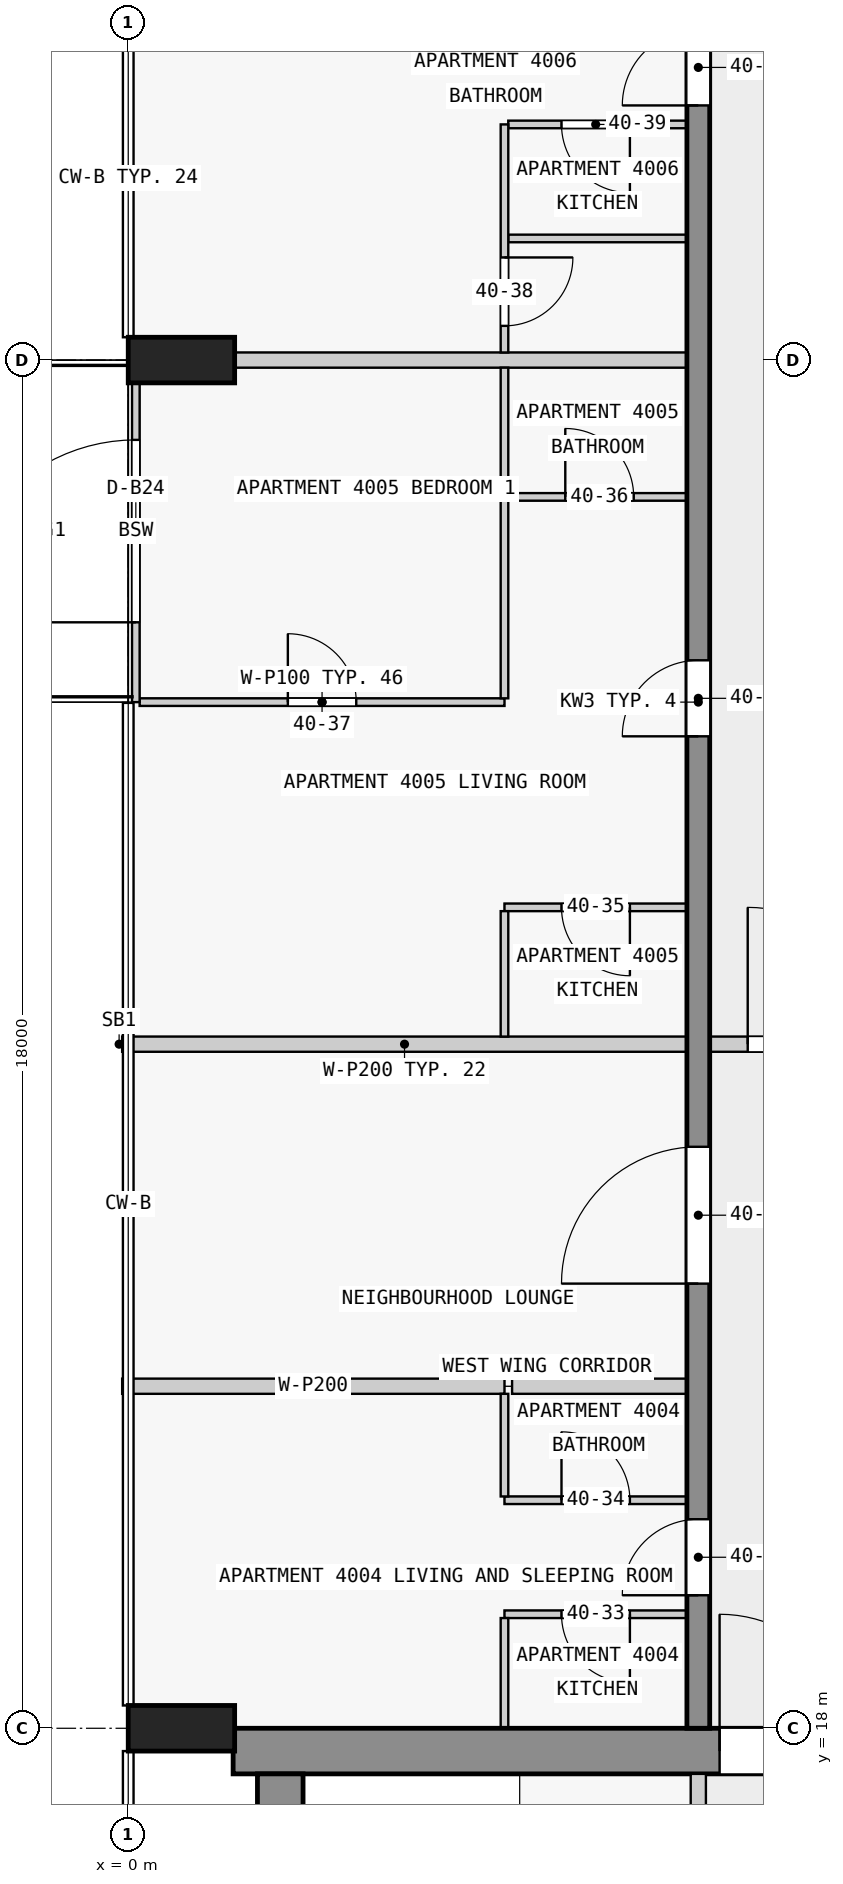
"""IFC4 building model, lengths in metres.
Left out: names, types, materials, properties, quantities, classifications, styles, units other than length and angle.
Written with IfcOpenShell. Run it as: python <this file> out.ifc"""

import sys

from ifc_helpers import new_model, si_unit, direction, frame, frame_2d, origin, origin_2d, place, context, subcontext, project, spatial, rectangle, extrude, element, fill, save


model = new_model("IFC4")
c1 = context("Model", 3, precision=1e-05, world=origin(), true_north=direction((0.0, 1.0)))
c2 = subcontext(c1, "Body", "Model", "MODEL_VIEW")
j1 = project(units=[si_unit("LENGTHUNIT", "METRE"), si_unit("PLANEANGLEUNIT", "RADIAN")], contexts=[c1])
p1 = place(None, origin())
s1 = spatial("IfcSite", under=j1, at=p1, CompositionType="ELEMENT")
p2 = place(p1, origin())
s2 = spatial("IfcBuilding", under=s1, at=p2, CompositionType="ELEMENT")
p3 = place(p2, frame((0.0, 0.0, 156.9)))
s3 = spatial("IfcBuildingStorey", under=s2, at=p3, CompositionType="ELEMENT", Elevation=156.9)
for number, where, z_axis, x_axis in (
    (1, (0.7, 36.0, 0.0), (0.0, 0.0, 1.0), (0.0, 1.0, 0.0)),
    (2, (0.7, 18.0, 0.0), (0.0, 0.0, 1.0), (0.0, 1.0, 0.0)),
):
    element("IfcColumn", number, at=place(p3, frame(where, z_axis=z_axis, x_axis=x_axis)), inside=s3, PredefinedType="COLUMN", context=c2, shape_type="SweptSolid", body=[
        extrude(rectangle(XDim=0.6, YDim=1.4, at=origin_2d()), origin(), (0.0, 0.0, 1.0), 3.5),
    ])
p4 = place(p3, frame((1.38, 17.7, 0.0), z_axis=(0.0, 0.0, 1.0), x_axis=(1.0, 0.0, 0.0)))
e3 = element("IfcWall", 3, at=p4, inside=s3, PredefinedType="SHEAR", context=c2, shape_type="SweptSolid", body=[
    extrude(rectangle(XDim=21.12, YDim=0.6, at=frame_2d((10.56, 0.0))), origin(), (0.0, 0.0, 1.0), 3.25),
])
p5 = place(p4, frame((6.4, 0.0, 0.0)))
e4 = element("IfcOpeningElement", 4, at=p5, cuts=e3, PredefinedType="OPENING", context=c2, shape_type="SweptSolid", body=[
    extrude(rectangle(XDim=1.8, YDim=2.1, at=frame_2d((0.9, 1.05))), frame((0.0, 0.31, 0.0), z_axis=(0.0, -1.0, 0.0), x_axis=(1.0, 0.0, 0.0)), (0.0, 0.0, 1.0), 0.62),
])
p6 = place(p3, frame((2.0, 2.5, 0.0), z_axis=(0.0, 0.0, 1.0), x_axis=(0.0, 1.0, 0.0)))
e5 = element("IfcWall", 5, at=p6, inside=s3, PredefinedType="SHEAR", context=c2, shape_type="SweptSolid", body=[
    extrude(rectangle(XDim=14.9, YDim=0.6, at=frame_2d((7.45, 0.0))), origin(), (0.0, 0.0, 1.0), 3.25),
])
p7 = place(p3, frame((7.5, 18.0, 0.0), z_axis=(0.0, 0.0, 1.0), x_axis=(0.0, 1.0, 0.0)))
e6 = element("IfcWall", 6, at=p7, inside=s3, PredefinedType="SHEAR", context=c2, shape_type="SweptSolid", body=[
    extrude(rectangle(XDim=27.0, YDim=0.3, at=frame_2d((13.5, 0.0))), origin(), (0.0, 0.0, 1.0), 3.25),
])
p8 = place(p7, frame((1.75, 0.0, 0.0)))
e7 = element("IfcOpeningElement", 7, at=p8, cuts=e6, PredefinedType="OPENING", context=c2, shape_type="SweptSolid", body=[
    extrude(rectangle(XDim=1.0, YDim=2.1, at=frame_2d((0.5, 1.05))), frame((0.0, 0.16, 0.0), z_axis=(0.0, -1.0, 0.0), x_axis=(1.0, 0.0, 0.0)), (0.0, 0.0, 1.0), 0.32),
])
p9 = place(p7, frame((5.85, 0.0, 0.0)))
e8 = element("IfcOpeningElement", 8, at=p9, cuts=e6, PredefinedType="OPENING", context=c2, shape_type="SweptSolid", body=[
    extrude(rectangle(XDim=1.8, YDim=2.1, at=frame_2d((0.9, 1.05))), frame((0.0, 0.16, 0.0), z_axis=(0.0, -1.0, 0.0), x_axis=(1.0, 0.0, 0.0)), (0.0, 0.0, 1.0), 0.32),
])
p10 = place(p7, frame((13.05, 0.0, 0.0)))
e9 = element("IfcOpeningElement", 9, at=p10, cuts=e6, PredefinedType="OPENING", context=c2, shape_type="SweptSolid", body=[
    extrude(rectangle(XDim=1.0, YDim=2.1, at=frame_2d((0.5, 1.05))), frame((0.0, 0.16, 0.0), z_axis=(0.0, -1.0, 0.0), x_axis=(1.0, 0.0, 0.0)), (0.0, 0.0, 1.0), 0.32),
])
p11 = place(p7, frame((21.35, 0.0, 0.0)))
e10 = element("IfcOpeningElement", 10, at=p11, cuts=e6, PredefinedType="OPENING", context=c2, shape_type="SweptSolid", body=[
    extrude(rectangle(XDim=1.0, YDim=2.1, at=frame_2d((0.5, 1.05))), frame((0.0, 0.16, 0.0), z_axis=(0.0, -1.0, 0.0), x_axis=(1.0, 0.0, 0.0)), (0.0, 0.0, 1.0), 0.32),
])
p12 = place(p3, frame((0.1, 31.5, 0.0), z_axis=(0.0, 0.0, 1.0), x_axis=(0.0, 1.0, 0.0)))
e11 = element("IfcWall", 11, at=p12, inside=s3, PredefinedType="STANDARD", context=c2, shape_type="SweptSolid", body=[
    extrude(rectangle(XDim=4.5, YDim=0.1, at=frame_2d((2.25, 0.0))), origin(), (0.0, 0.0, 1.0), 3.25),
])
p13 = place(p12, frame((1.05, 0.0, 0.0)))
e12 = element("IfcOpeningElement", 12, at=p13, cuts=e11, PredefinedType="OPENING", context=c2, shape_type="SweptSolid", body=[
    extrude(rectangle(XDim=2.4, YDim=2.4, at=frame_2d((1.2, 1.2))), frame((0.0, 0.06, 0.0), z_axis=(0.0, -1.0, 0.0), x_axis=(1.0, 0.0, 0.0)), (0.0, 0.0, 1.0), 0.12),
])
p14 = place(p3, frame((7.5, 10.1, 0.0), z_axis=(0.0, 0.0, 1.0), x_axis=(0.0, 1.0, 0.0)))
e13 = element("IfcWall", 13, at=p14, inside=s3, PredefinedType="PARTITIONING", context=c2, shape_type="SweptSolid", body=[
    extrude(rectangle(XDim=7.3, YDim=0.2, at=frame_2d((3.65, 0.0))), origin(), (0.0, 0.0, 1.0), 3.25),
])
p15 = place(p14, frame((0.75, 0.0, 0.0)))
e14 = element("IfcOpeningElement", 14, at=p15, cuts=e13, PredefinedType="OPENING", context=c2, shape_type="SweptSolid", body=[
    extrude(rectangle(XDim=0.9, YDim=2.1, at=frame_2d((0.45, 1.05))), frame((0.0, 0.11, 0.0), z_axis=(0.0, -1.0, 0.0), x_axis=(1.0, 0.0, 0.0)), (0.0, 0.0, 1.0), 0.22),
])
p16 = place(p14, frame((3.175, 0.0, 0.0)))
e15 = element("IfcOpeningElement", 15, at=p16, cuts=e13, PredefinedType="OPENING", context=c2, shape_type="SweptSolid", body=[
    extrude(rectangle(XDim=0.9, YDim=2.1, at=frame_2d((0.45, 1.05))), frame((0.0, 0.11, 0.0), z_axis=(0.0, -1.0, 0.0), x_axis=(1.0, 0.0, 0.0)), (0.0, 0.0, 1.0), 0.22),
])
p17 = place(p14, frame((5.25, 0.0, 0.0)))
e16 = element("IfcOpeningElement", 16, at=p17, cuts=e13, PredefinedType="OPENING", context=c2, shape_type="SweptSolid", body=[
    extrude(rectangle(XDim=0.9, YDim=2.1, at=frame_2d((0.45, 1.05))), frame((0.0, 0.11, 0.0), z_axis=(0.0, -1.0, 0.0), x_axis=(1.0, 0.0, 0.0)), (0.0, 0.0, 1.0), 0.22),
])
p18 = place(p3, frame((7.35, 19.5, 0.0), z_axis=(0.0, 0.0, 1.0), x_axis=(-1.0, 0.0, 0.0)))
e17 = element("IfcWall", 17, at=p18, inside=s3, PredefinedType="PARTITIONING", context=c2, shape_type="SweptSolid", body=[
    extrude(rectangle(XDim=2.4, YDim=0.1, at=frame_2d((1.2, 0.0))), origin(), (0.0, 0.0, 1.0), 3.25),
])
p19 = place(p18, frame((0.75, 0.0, 0.0)))
e18 = element("IfcOpeningElement", 18, at=p19, cuts=e17, PredefinedType="OPENING", context=c2, shape_type="SweptSolid", body=[
    extrude(rectangle(XDim=0.9, YDim=2.1, at=frame_2d((0.45, 1.05))), frame((0.0, 0.06, 0.0), z_axis=(0.0, -1.0, 0.0), x_axis=(1.0, 0.0, 0.0)), (0.0, 0.0, 1.0), 0.12),
])
p20 = place(p3, frame((4.95, 21.0, 0.0), z_axis=(0.0, 0.0, 1.0), x_axis=(1.0, 0.0, 0.0)))
e19 = element("IfcWall", 19, at=p20, inside=s3, PredefinedType="PARTITIONING", context=c2, shape_type="SweptSolid", body=[
    extrude(rectangle(XDim=2.4, YDim=0.1, at=frame_2d((1.2, 0.0))), origin(), (0.0, 0.0, 1.0), 3.25),
])
p21 = place(p20, frame((0.75, 0.0, 0.0)))
e20 = element("IfcOpeningElement", 20, at=p21, cuts=e19, PredefinedType="OPENING", context=c2, shape_type="SweptSolid", body=[
    extrude(rectangle(XDim=0.9, YDim=2.1, at=frame_2d((0.45, 1.05))), frame((0.0, 0.06, 0.0), z_axis=(0.0, -1.0, 0.0), x_axis=(1.0, 0.0, 0.0)), (0.0, 0.0, 1.0), 0.12),
])
p22 = place(p3, frame((7.35, 22.5, 0.0), z_axis=(0.0, 0.0, 1.0), x_axis=(-1.0, 0.0, 0.0)))
e21 = element("IfcWall", 21, at=p22, inside=s3, PredefinedType="PARTITIONING", context=c2, shape_type="SweptSolid", body=[
    extrude(rectangle(XDim=2.3, YDim=0.2, at=frame_2d((1.15, 0.0))), origin(), (0.0, 0.0, 1.0), 3.25),
])
p23 = place(p3, frame((-0.08, 22.5, 0.0), z_axis=(0.0, 0.0, 1.0), x_axis=(1.0, 0.0, 0.0)))
e22 = element("IfcWall", 22, at=p23, inside=s3, PredefinedType="PARTITIONING", context=c2, shape_type="SweptSolid", body=[
    extrude(rectangle(XDim=5.03, YDim=0.2, at=frame_2d((2.515, 0.0))), origin(), (0.0, 0.0, 1.0), 3.25),
])
p24 = place(p3, frame((7.35, 27.0, 0.0), z_axis=(0.0, 0.0, 1.0), x_axis=(-1.0, 0.0, 0.0)))
e23 = element("IfcWall", 23, at=p24, inside=s3, PredefinedType="PARTITIONING", context=c2, shape_type="SweptSolid", body=[
    extrude(rectangle(XDim=7.43, YDim=0.2, at=frame_2d((3.715, 0.0))), origin(), (0.0, 0.0, 1.0), 3.25),
])
p25 = place(p3, frame((7.35, 28.8, 0.0), z_axis=(0.0, 0.0, 1.0), x_axis=(-1.0, 0.0, 0.0)))
e24 = element("IfcWall", 24, at=p25, inside=s3, PredefinedType="PARTITIONING", context=c2, shape_type="SweptSolid", body=[
    extrude(rectangle(XDim=2.4, YDim=0.1, at=frame_2d((1.2, 0.0))), origin(), (0.0, 0.0, 1.0), 3.25),
])
p26 = place(p25, frame((0.75, 0.0, 0.0)))
e25 = element("IfcOpeningElement", 25, at=p26, cuts=e24, PredefinedType="OPENING", context=c2, shape_type="SweptSolid", body=[
    extrude(rectangle(XDim=0.9, YDim=2.1, at=frame_2d((0.45, 1.05))), frame((0.0, 0.06, 0.0), z_axis=(0.0, -1.0, 0.0), x_axis=(1.0, 0.0, 0.0)), (0.0, 0.0, 1.0), 0.12),
])
p27 = place(p3, frame((0.15, 31.5, 0.0), z_axis=(0.0, 0.0, 1.0), x_axis=(1.0, 0.0, 0.0)))
e26 = element("IfcWall", 26, at=p27, inside=s3, PredefinedType="PARTITIONING", context=c2, shape_type="SweptSolid", body=[
    extrude(rectangle(XDim=4.8, YDim=0.1, at=frame_2d((2.4, 0.0))), origin(), (0.0, 0.0, 1.0), 3.25),
])
p28 = place(p27, frame((1.95, 0.0, 0.0)))
e27 = element("IfcOpeningElement", 27, at=p28, cuts=e26, PredefinedType="OPENING", context=c2, shape_type="SweptSolid", body=[
    extrude(rectangle(XDim=0.9, YDim=2.1, at=frame_2d((0.45, 1.05))), frame((0.0, 0.06, 0.0), z_axis=(0.0, -1.0, 0.0), x_axis=(1.0, 0.0, 0.0)), (0.0, 0.0, 1.0), 0.12),
])
p29 = place(p3, frame((5.0, 34.2, 0.0), z_axis=(0.0, 0.0, 1.0), x_axis=(1.0, 0.0, 0.0)))
e28 = element("IfcWall", 28, at=p29, inside=s3, PredefinedType="PARTITIONING", context=c2, shape_type="SweptSolid", body=[
    extrude(rectangle(XDim=2.35, YDim=0.1, at=frame_2d((1.175, 0.0))), origin(), (0.0, 0.0, 1.0), 3.25),
])
p30 = place(p29, frame((0.75, 0.0, 0.0)))
e29 = element("IfcOpeningElement", 29, at=p30, cuts=e28, PredefinedType="OPENING", context=c2, shape_type="SweptSolid", body=[
    extrude(rectangle(XDim=0.9, YDim=2.1, at=frame_2d((0.45, 1.05))), frame((0.0, 0.06, 0.0), z_axis=(0.0, -1.0, 0.0), x_axis=(1.0, 0.0, 0.0)), (0.0, 0.0, 1.0), 0.12),
])
p31 = place(p3, frame((7.35, 36.0, 0.0), z_axis=(0.0, 0.0, 1.0), x_axis=(-1.0, 0.0, 0.0)))
e30 = element("IfcWall", 30, at=p31, inside=s3, PredefinedType="PARTITIONING", context=c2, shape_type="SweptSolid", body=[
    extrude(rectangle(XDim=5.95, YDim=0.2, at=frame_2d((2.975, 0.0))), origin(), (0.0, 0.0, 1.0), 3.25),
])
p32 = place(p3, frame((7.35, 37.6, 0.0), z_axis=(0.0, 0.0, 1.0), x_axis=(-1.0, 0.0, 0.0)))
e31 = element("IfcWall", 31, at=p32, inside=s3, PredefinedType="PARTITIONING", context=c2, shape_type="SweptSolid", body=[
    extrude(rectangle(XDim=2.35, YDim=0.1, at=frame_2d((1.175, 0.0))), origin(), (0.0, 0.0, 1.0), 3.25),
])
p33 = place(p3, frame((7.35, 39.1, 0.0), z_axis=(0.0, 0.0, 1.0), x_axis=(-1.0, 0.0, 0.0)))
e32 = element("IfcWall", 32, at=p33, inside=s3, PredefinedType="PARTITIONING", context=c2, shape_type="SweptSolid", body=[
    extrude(rectangle(XDim=2.35, YDim=0.1, at=frame_2d((1.175, 0.0))), origin(), (0.0, 0.0, 1.0), 3.25),
])
p34 = place(p33, frame((0.75, 0.0, 0.0)))
e33 = element("IfcOpeningElement", 33, at=p34, cuts=e32, PredefinedType="OPENING", context=c2, shape_type="SweptSolid", body=[
    extrude(rectangle(XDim=0.9, YDim=2.1, at=frame_2d((0.45, 1.05))), frame((0.0, 0.06, 0.0), z_axis=(0.0, -1.0, 0.0), x_axis=(1.0, 0.0, 0.0)), (0.0, 0.0, 1.0), 0.12),
])
p35 = place(p3, frame((4.95, 19.45, 0.0), z_axis=(0.0, 0.0, 1.0), x_axis=(0.0, -1.0, 0.0)))
e34 = element("IfcWall", 34, at=p35, inside=s3, PredefinedType="PARTITIONING", context=c2, shape_type="SweptSolid", body=[
    extrude(rectangle(XDim=1.45, YDim=0.1, at=frame_2d((0.725, 0.0))), origin(), (0.0, 0.0, 1.0), 3.25),
])
p36 = place(p3, frame((4.95, 22.4, 0.0), z_axis=(0.0, 0.0, 1.0), x_axis=(0.0, -1.0, 0.0)))
e35 = element("IfcWall", 35, at=p36, inside=s3, PredefinedType="PARTITIONING", context=c2, shape_type="SweptSolid", body=[
    extrude(rectangle(XDim=1.35, YDim=0.1, at=frame_2d((0.675, 0.0))), origin(), (0.0, 0.0, 1.0), 3.25),
])
p37 = place(p3, frame((4.95, 28.75, 0.0), z_axis=(0.0, 0.0, 1.0), x_axis=(0.0, -1.0, 0.0)))
e36 = element("IfcWall", 36, at=p37, inside=s3, PredefinedType="PARTITIONING", context=c2, shape_type="SweptSolid", body=[
    extrude(rectangle(XDim=1.65, YDim=0.1, at=frame_2d((0.825, 0.0))), origin(), (0.0, 0.0, 1.0), 3.25),
])
p38 = place(p3, frame((4.95, 35.9, 0.0), z_axis=(0.0, 0.0, 1.0), x_axis=(0.0, -1.0, 0.0)))
e37 = element("IfcWall", 37, at=p38, inside=s3, PredefinedType="PARTITIONING", context=c2, shape_type="SweptSolid", body=[
    extrude(rectangle(XDim=1.7, YDim=0.1, at=frame_2d((0.85, 0.0))), origin(), (0.0, 0.0, 1.0), 3.25),
])
p39 = place(p3, frame((4.95, 39.1, 0.0), z_axis=(0.0, 0.0, 1.0), x_axis=(0.0, -1.0, 0.0)))
e38 = element("IfcWall", 38, at=p39, inside=s3, PredefinedType="PARTITIONING", context=c2, shape_type="SweptSolid", body=[
    extrude(rectangle(XDim=3.0, YDim=0.1, at=frame_2d((1.5, 0.0))), origin(), (0.0, 0.0, 1.0), 3.25),
])
p40 = place(p39, frame((1.75, 0.0, 0.0)))
e39 = element("IfcOpeningElement", 39, at=p40, cuts=e38, PredefinedType="OPENING", context=c2, shape_type="SweptSolid", body=[
    extrude(rectangle(XDim=0.9, YDim=2.1, at=frame_2d((0.45, 1.05))), frame((0.0, 0.06, 0.0), z_axis=(0.0, -1.0, 0.0), x_axis=(1.0, 0.0, 0.0)), (0.0, 0.0, 1.0), 0.12),
])
p41 = place(p3, frame((4.95, 31.55, 0.0), z_axis=(0.0, 0.0, 1.0), x_axis=(0.0, 1.0, 0.0)))
e40 = element("IfcWall", 40, at=p41, inside=s3, PredefinedType="PARTITIONING", context=c2, shape_type="SweptSolid", body=[
    extrude(rectangle(XDim=2.6, YDim=0.1, at=frame_2d((1.3, 0.0))), origin(), (0.0, 0.0, 1.0), 3.25),
])
p42 = place(p3, frame((7.45, 27.0, 0.0), z_axis=(0.0, 0.0, 1.0), x_axis=(1.0, 0.0, 0.0)))
e41 = element("IfcWall", 41, at=p42, inside=s3, PredefinedType="PARTITIONING", context=c2, shape_type="SweptSolid", body=[
    extrude(rectangle(XDim=3.2, YDim=0.2, at=frame_2d((1.6, 0.0))), origin(), (0.0, 0.0, 1.0), 3.25),
])
p43 = place(p42, frame((0.7, 0.0, 0.0)))
e42 = element("IfcOpeningElement", 42, at=p43, cuts=e41, PredefinedType="OPENING", context=c2, shape_type="SweptSolid", body=[
    extrude(rectangle(XDim=1.8, YDim=2.1, at=frame_2d((0.9, 1.05))), frame((0.0, 0.11, 0.0), z_axis=(0.0, -1.0, 0.0), x_axis=(1.0, 0.0, 0.0)), (0.0, 0.0, 1.0), 0.22),
])
p44 = place(p13, origin())
e43 = element("IfcDoor", 43, at=p44, inside=s3, OperationType="SINGLE_SWING_LEFT", PredefinedType="DOOR", context=c2, shape_type="SweptSolid", body=[
    extrude(rectangle(XDim=2.4, YDim=2.4, at=frame_2d((1.2, 1.2))), frame((0.0, 0.025, 0.0), z_axis=(0.0, -1.0, 0.0), x_axis=(1.0, 0.0, 0.0)), (0.0, 0.0, 1.0), 0.05),
])
fill(e12, e43)
p45 = place(p5, origin())
e44 = element("IfcDoor", 44, at=p45, inside=s3, OperationType="DOUBLE_DOOR_SINGLE_SWING", PredefinedType="DOOR", context=c2, shape_type="SweptSolid", body=[
    extrude(rectangle(XDim=1.8, YDim=2.1, at=frame_2d((0.9, 1.05))), frame((0.0, 0.025, 0.0), z_axis=(0.0, -1.0, 0.0), x_axis=(1.0, 0.0, 0.0)), (0.0, 0.0, 1.0), 0.05),
])
fill(e4, e44)
p46 = place(p8, origin())
e45 = element("IfcDoor", 45, at=p46, inside=s3, OperationType="SINGLE_SWING_LEFT", PredefinedType="DOOR", context=c2, shape_type="SweptSolid", body=[
    extrude(rectangle(XDim=1.0, YDim=2.1, at=frame_2d((0.5, 1.05))), frame((0.0, 0.025, 0.0), z_axis=(0.0, -1.0, 0.0), x_axis=(1.0, 0.0, 0.0)), (0.0, 0.0, 1.0), 0.05),
])
fill(e7, e45)
p47 = place(p9, origin())
e46 = element("IfcDoor", 46, at=p47, inside=s3, OperationType="SINGLE_SWING_LEFT", PredefinedType="DOOR", context=c2, shape_type="SweptSolid", body=[
    extrude(rectangle(XDim=1.8, YDim=2.1, at=frame_2d((0.9, 1.05))), frame((0.0, 0.025, 0.0), z_axis=(0.0, -1.0, 0.0), x_axis=(1.0, 0.0, 0.0)), (0.0, 0.0, 1.0), 0.05),
])
fill(e8, e46)
p48 = place(p10, origin())
e47 = element("IfcDoor", 47, at=p48, inside=s3, OperationType="SINGLE_SWING_RIGHT", PredefinedType="DOOR", context=c2, shape_type="SweptSolid", body=[
    extrude(rectangle(XDim=1.0, YDim=2.1, at=frame_2d((0.5, 1.05))), frame((0.0, 0.025, 0.0), z_axis=(0.0, -1.0, 0.0), x_axis=(1.0, 0.0, 0.0)), (0.0, 0.0, 1.0), 0.05),
])
fill(e9, e47)
p49 = place(p11, origin())
e48 = element("IfcDoor", 48, at=p49, inside=s3, OperationType="SINGLE_SWING_RIGHT", PredefinedType="DOOR", context=c2, shape_type="SweptSolid", body=[
    extrude(rectangle(XDim=1.0, YDim=2.1, at=frame_2d((0.5, 1.05))), frame((0.0, 0.025, 0.0), z_axis=(0.0, -1.0, 0.0), x_axis=(1.0, 0.0, 0.0)), (0.0, 0.0, 1.0), 0.05),
])
fill(e10, e48)
p50 = place(p43, origin())
e49 = element("IfcDoor", 49, at=p50, inside=s3, OperationType="SINGLE_SWING_LEFT", PredefinedType="DOOR", context=c2, shape_type="SweptSolid", body=[
    extrude(rectangle(XDim=1.8, YDim=2.1, at=frame_2d((0.9, 1.05))), frame((0.0, 0.025, 0.0), z_axis=(0.0, -1.0, 0.0), x_axis=(1.0, 0.0, 0.0)), (0.0, 0.0, 1.0), 0.05),
])
fill(e42, e49)
p51 = place(p19, origin())
e50 = element("IfcDoor", 50, at=p51, inside=s3, OperationType="SINGLE_SWING_RIGHT", PredefinedType="DOOR", context=c2, shape_type="SweptSolid", body=[
    extrude(rectangle(XDim=0.9, YDim=2.1, at=frame_2d((0.45, 1.05))), frame((0.0, 0.025, 0.0), z_axis=(0.0, -1.0, 0.0), x_axis=(1.0, 0.0, 0.0)), (0.0, 0.0, 1.0), 0.05),
])
fill(e18, e50)
p52 = place(p21, origin())
e51 = element("IfcDoor", 51, at=p52, inside=s3, OperationType="SINGLE_SWING_RIGHT", PredefinedType="DOOR", context=c2, shape_type="SweptSolid", body=[
    extrude(rectangle(XDim=0.9, YDim=2.1, at=frame_2d((0.45, 1.05))), frame((0.0, 0.025, 0.0), z_axis=(0.0, -1.0, 0.0), x_axis=(1.0, 0.0, 0.0)), (0.0, 0.0, 1.0), 0.05),
])
fill(e20, e51)
p53 = place(p26, origin())
e52 = element("IfcDoor", 52, at=p53, inside=s3, OperationType="SINGLE_SWING_RIGHT", PredefinedType="DOOR", context=c2, shape_type="SweptSolid", body=[
    extrude(rectangle(XDim=0.9, YDim=2.1, at=frame_2d((0.45, 1.05))), frame((0.0, 0.025, 0.0), z_axis=(0.0, -1.0, 0.0), x_axis=(1.0, 0.0, 0.0)), (0.0, 0.0, 1.0), 0.05),
])
fill(e25, e52)
p54 = place(p30, origin())
e53 = element("IfcDoor", 53, at=p54, inside=s3, OperationType="SINGLE_SWING_RIGHT", PredefinedType="DOOR", context=c2, shape_type="SweptSolid", body=[
    extrude(rectangle(XDim=0.9, YDim=2.1, at=frame_2d((0.45, 1.05))), frame((0.0, 0.025, 0.0), z_axis=(0.0, -1.0, 0.0), x_axis=(1.0, 0.0, 0.0)), (0.0, 0.0, 1.0), 0.05),
])
fill(e29, e53)
p55 = place(p28, origin())
e54 = element("IfcDoor", 54, at=p55, inside=s3, OperationType="SINGLE_SWING_LEFT", PredefinedType="DOOR", context=c2, shape_type="SweptSolid", body=[
    extrude(rectangle(XDim=0.9, YDim=2.1, at=frame_2d((0.45, 1.05))), frame((0.0, 0.025, 0.0), z_axis=(0.0, -1.0, 0.0), x_axis=(1.0, 0.0, 0.0)), (0.0, 0.0, 1.0), 0.05),
])
fill(e27, e54)
p56 = place(p40, origin())
e55 = element("IfcDoor", 55, at=p56, inside=s3, OperationType="SINGLE_SWING_RIGHT", PredefinedType="DOOR", context=c2, shape_type="SweptSolid", body=[
    extrude(rectangle(XDim=0.9, YDim=2.1, at=frame_2d((0.45, 1.05))), frame((0.0, 0.025, 0.0), z_axis=(0.0, -1.0, 0.0), x_axis=(1.0, 0.0, 0.0)), (0.0, 0.0, 1.0), 0.05),
])
fill(e39, e55)
p57 = place(p34, origin())
e56 = element("IfcDoor", 56, at=p57, inside=s3, OperationType="SINGLE_SWING_RIGHT", PredefinedType="DOOR", context=c2, shape_type="SweptSolid", body=[
    extrude(rectangle(XDim=0.9, YDim=2.1, at=frame_2d((0.45, 1.05))), frame((0.0, 0.025, 0.0), z_axis=(0.0, -1.0, 0.0), x_axis=(1.0, 0.0, 0.0)), (0.0, 0.0, 1.0), 0.05),
])
fill(e33, e56)
save(model, sys.argv[1])
